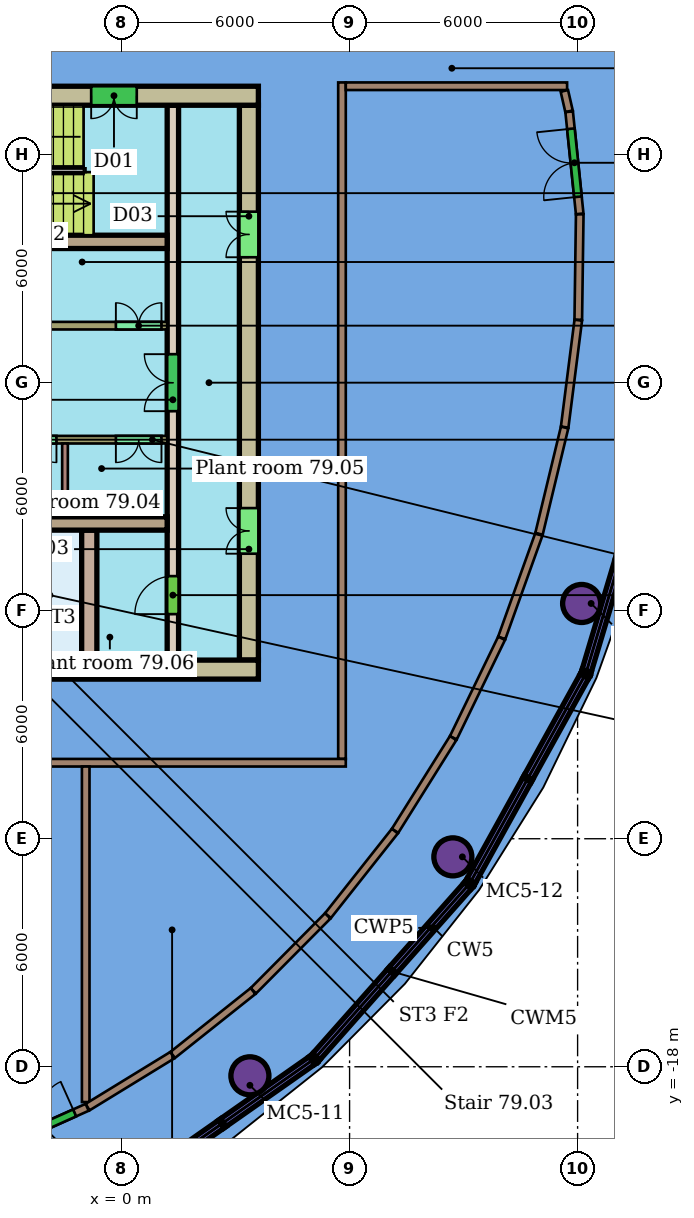
"""IFC4 building model, lengths in metres.
Left out: names, types, materials, properties, quantities, classifications, styles, units other than length and angle.
Written with IfcOpenShell. Run it as: python <this file> out.ifc"""

import sys

from ifc_helpers import new_model, si_unit, direction, frame, frame_2d, origin, origin_2d, place, context, subcontext, project, spatial, rectangle, hollow_circle, extrude, element, fill, save


model = new_model("IFC4")
c1 = context("Model", 3, precision=1e-05, world=origin(), true_north=direction((0.0, 1.0)))
c2 = subcontext(c1, "Body", "Model", "MODEL_VIEW")
j1 = project(units=[si_unit("LENGTHUNIT", "METRE"), si_unit("PLANEANGLEUNIT", "RADIAN")], contexts=[c1])
p1 = place(None, origin())
s1 = spatial("IfcSite", under=j1, at=p1, CompositionType="ELEMENT")
p2 = place(p1, origin())
s2 = spatial("IfcBuilding", under=s1, at=p2, CompositionType="ELEMENT")
p3 = place(p2, frame((0.0, 0.0, 317.1)))
s3 = spatial("IfcBuildingStorey", under=s2, at=p3, CompositionType="ELEMENT", Elevation=317.1)
for number, where, z_axis, x_axis in (
    (1, (3.377, -18.238, 0.0), (0.0, 0.0, 1.0), (1.0, 0.0, 0.0)),
    (2, (8.718, -12.477, 0.0), (0.0, 0.0, 1.0), (1.0, 0.0, 0.0)),
    (3, (12.106, -5.81, 0.0), (0.0, 0.0, 1.0), (1.0, 0.0, 0.0)),
):
    element("IfcColumn", number, at=place(p3, frame(where, z_axis=z_axis, x_axis=x_axis)), inside=s3, PredefinedType="COLUMN", context=c2, shape_type="SweptSolid", body=[
        extrude(hollow_circle(Radius=0.5, WallThickness=0.04, at=origin_2d()), origin(), (0.0, 0.0, 1.0), 4.0),
    ])
p4 = place(p3, frame((5.8, -9.9, 0.0), z_axis=(0.0, 0.0, 1.0), x_axis=(0.0, 1.0, 0.0)))
e4 = element("IfcWall", 4, at=p4, inside=s3, PredefinedType="PARTITIONING", context=c2, shape_type="SweptSolid", body=[
    extrude(rectangle(XDim=17.8, YDim=0.2, at=frame_2d((8.9, 0.0))), origin(), (0.0, 0.0, 1.0), 3.65),
])
p5 = place(p3, frame((-23.076, -10.0, 0.0), z_axis=(0.0, 0.0, 1.0), x_axis=(1.0, 0.0, 0.0)))
e5 = element("IfcWall", 5, at=p5, inside=s3, PredefinedType="PARTITIONING", context=c2, shape_type="SweptSolid", body=[
    extrude(rectangle(XDim=28.976, YDim=0.2, at=frame_2d((14.488, 0.0))), origin(), (0.0, 0.0, 1.0), 3.65),
])
p6 = place(p3, frame((5.9, 7.8, 0.0), z_axis=(0.0, 0.0, 1.0), x_axis=(1.0, 0.0, 0.0)))
e6 = element("IfcWall", 6, at=p6, inside=s3, PredefinedType="PARTITIONING", context=c2, shape_type="SweptSolid", body=[
    extrude(rectangle(XDim=5.824, YDim=0.2, at=frame_2d((2.912, 0.0))), origin(), (0.0, 0.0, 1.0), 3.65),
])
p7 = place(p3, frame((-0.944, -18.929, 0.0), z_axis=(0.0, 0.0, 1.0), x_axis=(0.0, 1.0, 0.0)))
e7 = element("IfcWall", 7, at=p7, inside=s3, PredefinedType="PARTITIONING", context=c2, shape_type="SweptSolid", body=[
    extrude(rectangle(XDim=8.829, YDim=0.2, at=frame_2d((4.415, 0.0))), origin(), (0.0, 0.0, 1.0), 3.65),
])
p8 = place(p3, frame((12.018, 1.656, 0.0), z_axis=(0.0, 0.0, 1.0), x_axis=(0.013897320686, 0.999903427576, 0.0)))
e8 = element("IfcWall", 8, at=p8, inside=s3, PredefinedType="PARTITIONING", context=c2, shape_type="SweptSolid", body=[
    extrude(rectangle(XDim=2.776, YDim=0.2, at=frame_2d((1.388, 0.0))), origin(), (0.0, 0.0, 1.0), 3.65),
])
p9 = place(p3, frame((11.659, -1.169, 0.0), z_axis=(0.0, 0.0, 1.0), x_axis=(0.126302032537, 0.991991832919, 0.0)))
e9 = element("IfcWall", 9, at=p9, inside=s3, PredefinedType="PARTITIONING", context=c2, shape_type="SweptSolid", body=[
    extrude(rectangle(XDim=2.836, YDim=0.2, at=frame_2d((1.418, 0.0))), origin(), (0.0, 0.0, 1.0), 3.65),
])
p10 = place(p3, frame((10.984, -3.977, 0.0), z_axis=(0.0, 0.0, 1.0), x_axis=(0.234120678443, 0.972207543648, 0.0)))
e10 = element("IfcWall", 10, at=p10, inside=s3, PredefinedType="PARTITIONING", context=c2, shape_type="SweptSolid", body=[
    extrude(rectangle(XDim=2.877, YDim=0.2, at=frame_2d((1.438, 0.0))), origin(), (0.0, 0.0, 1.0), 3.65),
])
p11 = place(p3, frame((10.004, -6.716, 0.0), z_axis=(0.0, 0.0, 1.0), x_axis=(0.337478197562, 0.941333344873, 0.0)))
e11 = element("IfcWall", 11, at=p11, inside=s3, PredefinedType="PARTITIONING", context=c2, shape_type="SweptSolid", body=[
    extrude(rectangle(XDim=2.898, YDim=0.2, at=frame_2d((1.449, 0.0))), origin(), (0.0, 0.0, 1.0), 3.65),
])
p12 = place(p3, frame((8.73, -9.343, 0.0), z_axis=(0.0, 0.0, 1.0), x_axis=(0.436405284506, 0.89975020292, 0.0)))
e12 = element("IfcWall", 12, at=p12, inside=s3, PredefinedType="PARTITIONING", context=c2, shape_type="SweptSolid", body=[
    extrude(rectangle(XDim=2.909, YDim=0.2, at=frame_2d((1.455, 0.0))), origin(), (0.0, 0.0, 1.0), 3.65),
])
p13 = place(p3, frame((7.198, -11.791, 0.0), z_axis=(0.0, 0.0, 1.0), x_axis=(0.530761457751, 0.847521253401, 0.0)))
e13 = element("IfcWall", 13, at=p13, inside=s3, PredefinedType="PARTITIONING", context=c2, shape_type="SweptSolid", body=[
    extrude(rectangle(XDim=2.877, YDim=0.2, at=frame_2d((1.438, 0.0))), origin(), (0.0, 0.0, 1.0), 3.65),
])
p14 = place(p3, frame((5.432, -14.023, 0.0), z_axis=(0.0, 0.0, 1.0), x_axis=(0.620327979869, 0.784342525553, 0.0)))
e14 = element("IfcWall", 14, at=p14, inside=s3, PredefinedType="PARTITIONING", context=c2, shape_type="SweptSolid", body=[
    extrude(rectangle(XDim=2.836, YDim=0.2, at=frame_2d((1.418, 0.0))), origin(), (0.0, 0.0, 1.0), 3.65),
])
p15 = place(p3, frame((3.468, -16.001, 0.0), z_axis=(0.0, 0.0, 1.0), x_axis=(0.704683921548, 0.70952136734, 0.0)))
e15 = element("IfcWall", 15, at=p15, inside=s3, PredefinedType="PARTITIONING", context=c2, shape_type="SweptSolid", body=[
    extrude(rectangle(XDim=2.776, YDim=0.2, at=frame_2d((1.388, 0.0))), origin(), (0.0, 0.0, 1.0), 3.65),
])
p16 = place(p3, frame((1.345, -17.689, 0.0), z_axis=(0.0, 0.0, 1.0), x_axis=(0.782656107767, 0.62245434931, 0.0)))
e16 = element("IfcWall", 16, at=p16, inside=s3, PredefinedType="PARTITIONING", context=c2, shape_type="SweptSolid", body=[
    extrude(rectangle(XDim=2.7, YDim=0.2, at=frame_2d((1.35, 0.0))), origin(), (0.0, 0.0, 1.0), 3.65),
])
p17 = place(p3, frame((-0.894, -19.061, 0.0), z_axis=(0.0, 0.0, 1.0), x_axis=(0.852667029926, 0.522454721557, 0.0)))
e17 = element("IfcWall", 17, at=p17, inside=s3, PredefinedType="PARTITIONING", context=c2, shape_type="SweptSolid", body=[
    extrude(rectangle(XDim=2.614, YDim=0.2, at=frame_2d((1.307, 0.0))), origin(), (0.0, 0.0, 1.0), 3.65),
])
p18 = place(p3, frame((-3.206, -20.097, 0.0), z_axis=(0.0, 0.0, 1.0), x_axis=(0.912552955942, 0.408958558538, 0.0)))
e18 = element("IfcWall", 18, at=p18, inside=s3, PredefinedType="PARTITIONING", context=c2, shape_type="SweptSolid", body=[
    extrude(rectangle(XDim=2.521, YDim=0.2, at=frame_2d((1.26, 0.0))), origin(), (0.0, 0.0, 1.0), 3.65),
])
p19 = place(p18, frame((0.36, 0.0, 0.0)))
e19 = element("IfcOpeningElement", 19, at=p19, cuts=e18, PredefinedType="OPENING", context=c2, shape_type="SweptSolid", body=[
    extrude(rectangle(XDim=1.8, YDim=2.4, at=frame_2d((0.9, 1.2))), frame((0.0, 0.11, 0.0), z_axis=(0.0, -1.0, 0.0), x_axis=(1.0, 0.0, 0.0)), (0.0, 0.0, 1.0), 0.22),
])
p20 = place(p3, frame((11.652, 7.678, 0.0), z_axis=(0.0, 0.0, 1.0), x_axis=(0.2234024776, -0.974726286196, 0.0)))
e20 = element("IfcWall", 20, at=p20, inside=s3, PredefinedType="PARTITIONING", context=c2, shape_type="SweptSolid", body=[
    extrude(rectangle(XDim=0.551, YDim=0.2, at=frame_2d((0.275, 0.0))), origin(), (0.0, 0.0, 1.0), 3.65),
])
p21 = place(p3, frame((12.055, 4.443, 0.0), z_axis=(0.0, 0.0, 1.0), x_axis=(-0.102877560919, 0.994694027055, 0.0)))
e21 = element("IfcWall", 21, at=p21, inside=s3, PredefinedType="PARTITIONING", context=c2, shape_type="SweptSolid", body=[
    extrude(rectangle(XDim=2.701, YDim=0.2, at=frame_2d((1.35, 0.0))), origin(), (0.0, 0.0, 1.0), 3.65),
])
p22 = place(p21, frame((0.45, 0.0, 0.0)))
e22 = element("IfcOpeningElement", 22, at=p22, cuts=e21, PredefinedType="OPENING", context=c2, shape_type="SweptSolid", body=[
    extrude(rectangle(XDim=1.8, YDim=2.4, at=frame_2d((0.9, 1.2))), frame((0.0, 0.11, 0.0), z_axis=(0.0, -1.0, 0.0), x_axis=(1.0, 0.0, 0.0)), (0.0, 0.0, 1.0), 0.22),
])
p23 = place(p3, frame((3.6, 7.55, 0.0), z_axis=(0.0, 0.0, 1.0), x_axis=(-1.0, 0.0, 0.0)))
e23 = element("IfcWall", 23, at=p23, inside=s3, PredefinedType="SHEAR", context=c2, shape_type="SweptSolid", body=[
    extrude(rectangle(XDim=9.6, YDim=0.5, at=frame_2d((4.8, 0.0))), origin(), (0.0, 0.0, 1.0), 3.9),
])
p24 = place(p23, frame((3.2, 0.0, 0.0)))
e24 = element("IfcOpeningElement", 24, at=p24, cuts=e23, PredefinedType="OPENING", context=c2, shape_type="SweptSolid", body=[
    extrude(rectangle(XDim=1.2, YDim=2.1, at=frame_2d((0.6, 1.05))), frame((0.0, 0.26, 0.0), z_axis=(0.0, -1.0, 0.0), x_axis=(1.0, 0.0, 0.0)), (0.0, 0.0, 1.0), 0.52),
])
p25 = place(p3, frame((-15.6, -7.55, 0.0), z_axis=(0.0, 0.0, 1.0), x_axis=(1.0, 0.0, 0.0)))
e25 = element("IfcWall", 25, at=p25, inside=s3, PredefinedType="SHEAR", context=c2, shape_type="SweptSolid", body=[
    extrude(rectangle(XDim=19.2, YDim=0.5, at=frame_2d((9.6, 0.0))), origin(), (0.0, 0.0, 1.0), 3.9),
])
p26 = place(p25, frame((3.6, 0.0, 0.0)))
e26 = element("IfcOpeningElement", 26, at=p26, cuts=e25, PredefinedType="OPENING", context=c2, shape_type="SweptSolid", body=[
    extrude(rectangle(XDim=1.2, YDim=2.1, at=frame_2d((0.6, 1.05))), frame((0.0, 0.26, 0.0), z_axis=(0.0, -1.0, 0.0), x_axis=(1.0, 0.0, 0.0)), (0.0, 0.0, 1.0), 0.52),
])
p27 = place(p3, frame((3.35, -7.3, 0.0), z_axis=(0.0, 0.0, 1.0), x_axis=(0.0, 1.0, 0.0)))
e27 = element("IfcWall", 27, at=p27, inside=s3, PredefinedType="SHEAR", context=c2, shape_type="SweptSolid", body=[
    extrude(rectangle(XDim=14.6, YDim=0.5, at=frame_2d((7.3, 0.0))), origin(), (0.0, 0.0, 1.0), 3.9),
])
p28 = place(p27, frame((2.8, 0.0, 0.0)))
e28 = element("IfcOpeningElement", 28, at=p28, cuts=e27, PredefinedType="OPENING", context=c2, shape_type="SweptSolid", body=[
    extrude(rectangle(XDim=1.2, YDim=2.1, at=frame_2d((0.6, 1.05))), frame((0.0, 0.26, 0.0), z_axis=(0.0, -1.0, 0.0), x_axis=(1.0, 0.0, 0.0)), (0.0, 0.0, 1.0), 0.52),
])
p29 = place(p27, frame((10.6, 0.0, 0.0)))
e29 = element("IfcOpeningElement", 29, at=p29, cuts=e27, PredefinedType="OPENING", context=c2, shape_type="SweptSolid", body=[
    extrude(rectangle(XDim=1.2, YDim=2.1, at=frame_2d((0.6, 1.05))), frame((0.0, 0.26, 0.0), z_axis=(0.0, -1.0, 0.0), x_axis=(1.0, 0.0, 0.0)), (0.0, 0.0, 1.0), 0.52),
])
for number, where, z_axis, x_axis in (
    (30, (-6.0, 3.705, 0.0), (0.0, 0.0, 1.0), (1.0, 0.0, 0.0)),
    (31, (-6.0, -3.705, 0.0), (0.0, 0.0, 1.0), (1.0, 0.0, 0.0)),
):
    element("IfcWall", number, at=place(p3, frame(where, z_axis=z_axis, x_axis=x_axis)), inside=s3, PredefinedType="SHEAR", context=c2, shape_type="SweptSolid", body=[
        extrude(rectangle(XDim=7.2, YDim=0.35, at=frame_2d((3.6, 0.0))), origin(), (0.0, 0.0, 1.0), 3.9),
    ])
p30 = place(p3, frame((1.35, -7.3, 0.0), z_axis=(0.0, 0.0, 1.0), x_axis=(0.0, 1.0, 0.0)))
e32 = element("IfcWall", 32, at=p30, inside=s3, PredefinedType="SHEAR", context=c2, shape_type="SweptSolid", body=[
    extrude(rectangle(XDim=14.6, YDim=0.3, at=frame_2d((7.3, 0.0))), origin(), (0.0, 0.0, 1.0), 3.9),
])
p31 = place(p30, frame((1.21, 0.0, 0.0)))
e33 = element("IfcOpeningElement", 33, at=p31, cuts=e32, PredefinedType="OPENING", context=c2, shape_type="SweptSolid", body=[
    extrude(rectangle(XDim=1.0, YDim=2.1, at=frame_2d((0.5, 1.05))), frame((0.0, 0.16, 0.0), z_axis=(0.0, -1.0, 0.0), x_axis=(1.0, 0.0, 0.0)), (0.0, 0.0, 1.0), 0.32),
])
p32 = place(p30, frame((6.55, 0.0, 0.0)))
e34 = element("IfcOpeningElement", 34, at=p32, cuts=e32, PredefinedType="OPENING", context=c2, shape_type="SweptSolid", body=[
    extrude(rectangle(XDim=1.5, YDim=2.1, at=frame_2d((0.75, 1.05))), frame((0.0, 0.16, 0.0), z_axis=(0.0, -1.0, 0.0), x_axis=(1.0, 0.0, 0.0)), (0.0, 0.0, 1.0), 0.32),
])
p33 = place(p3, frame((-13.2, 1.5, 0.0), z_axis=(0.0, 0.0, 1.0), x_axis=(1.0, 0.0, 0.0)))
e35 = element("IfcWall", 35, at=p33, inside=s3, PredefinedType="SHEAR", context=c2, shape_type="SweptSolid", body=[
    extrude(rectangle(XDim=14.4, YDim=0.2, at=frame_2d((7.2, 0.0))), origin(), (0.0, 0.0, 1.0), 3.9),
])
p34 = place(p33, frame((0.15, 0.0, 0.0)))
e36 = element("IfcOpeningElement", 36, at=p34, cuts=e35, PredefinedType="OPENING", context=c2, shape_type="SweptSolid", body=[
    extrude(rectangle(XDim=1.2, YDim=2.4, at=frame_2d((0.6, 1.2))), frame((0.0, 0.11, 0.0), z_axis=(0.0, -1.0, 0.0), x_axis=(1.0, 0.0, 0.0)), (0.0, 0.0, 1.0), 0.22),
])
p35 = place(p33, frame((9.519, 0.0, 0.0)))
e37 = element("IfcOpeningElement", 37, at=p35, cuts=e35, PredefinedType="OPENING", context=c2, shape_type="SweptSolid", body=[
    extrude(rectangle(XDim=1.2, YDim=2.4, at=frame_2d((0.6, 1.2))), frame((0.0, 0.11, 0.0), z_axis=(0.0, -1.0, 0.0), x_axis=(1.0, 0.0, 0.0)), (0.0, 0.0, 1.0), 0.22),
])
p36 = place(p33, frame((13.05, 0.0, 0.0)))
e38 = element("IfcOpeningElement", 38, at=p36, cuts=e35, PredefinedType="OPENING", context=c2, shape_type="SweptSolid", body=[
    extrude(rectangle(XDim=1.2, YDim=2.4, at=frame_2d((0.6, 1.2))), frame((0.0, 0.11, 0.0), z_axis=(0.0, -1.0, 0.0), x_axis=(1.0, 0.0, 0.0)), (0.0, 0.0, 1.0), 0.22),
])
p37 = place(p3, frame((1.2, -1.5, 0.0), z_axis=(0.0, 0.0, 1.0), x_axis=(-1.0, 0.0, 0.0)))
e39 = element("IfcWall", 39, at=p37, inside=s3, PredefinedType="SHEAR", context=c2, shape_type="SweptSolid", body=[
    extrude(rectangle(XDim=14.4, YDim=0.2, at=frame_2d((7.2, 0.0))), origin(), (0.0, 0.0, 1.0), 3.9),
])
p38 = place(p37, frame((7.821, 0.0, 0.0)))
e40 = element("IfcOpeningElement", 40, at=p38, cuts=e39, PredefinedType="OPENING", context=c2, shape_type="SweptSolid", body=[
    extrude(rectangle(XDim=1.2, YDim=2.1, at=frame_2d((0.6, 1.05))), frame((0.0, 0.11, 0.0), z_axis=(0.0, -1.0, 0.0), x_axis=(1.0, 0.0, 0.0)), (0.0, 0.0, 1.0), 0.22),
])
p39 = place(p37, frame((2.914, 0.0, 0.0)))
e41 = element("IfcOpeningElement", 41, at=p39, cuts=e39, PredefinedType="OPENING", context=c2, shape_type="SweptSolid", body=[
    extrude(rectangle(XDim=1.2, YDim=2.4, at=frame_2d((0.6, 1.2))), frame((0.0, 0.11, 0.0), z_axis=(0.0, -1.0, 0.0), x_axis=(1.0, 0.0, 0.0)), (0.0, 0.0, 1.0), 0.22),
])
p40 = place(p37, frame((0.15, 0.0, 0.0)))
e42 = element("IfcOpeningElement", 42, at=p40, cuts=e39, PredefinedType="OPENING", context=c2, shape_type="SweptSolid", body=[
    extrude(rectangle(XDim=1.2, YDim=2.4, at=frame_2d((0.6, 1.2))), frame((0.0, 0.11, 0.0), z_axis=(0.0, -1.0, 0.0), x_axis=(1.0, 0.0, 0.0)), (0.0, 0.0, 1.0), 0.22),
])
p41 = place(p3, frame((-0.85, -3.88, 0.0), z_axis=(0.0, 0.0, 1.0), x_axis=(0.0, -1.0, 0.0)))
e43 = element("IfcWall", 43, at=p41, inside=s3, PredefinedType="SHEAR", context=c2, shape_type="SweptSolid", body=[
    extrude(rectangle(XDim=3.42, YDim=0.4, at=frame_2d((1.71, 0.0))), origin(), (0.0, 0.0, 1.0), 3.9),
])
p42 = place(p3, frame((-1.489, -1.6, 0.0), z_axis=(0.0, 0.0, 1.0), x_axis=(0.0, -1.0, 0.0)))
e44 = element("IfcWall", 44, at=p42, inside=s3, PredefinedType="PARTITIONING", context=c2, shape_type="SweptSolid", body=[
    extrude(rectangle(XDim=1.93, YDim=0.15, at=frame_2d((0.965, 0.0))), origin(), (0.0, 0.0, 1.0), 3.9),
])
p43 = place(p19, origin())
e45 = element("IfcDoor", 45, at=p43, inside=s3, OperationType="DOUBLE_DOOR_SINGLE_SWING", PredefinedType="DOOR", context=c2, shape_type="SweptSolid", body=[
    extrude(rectangle(XDim=1.8, YDim=2.4, at=frame_2d((0.9, 1.2))), frame((0.0, 0.025, 0.0), z_axis=(0.0, -1.0, 0.0), x_axis=(1.0, 0.0, 0.0)), (0.0, 0.0, 1.0), 0.05),
])
fill(e19, e45)
p44 = place(p22, origin())
e46 = element("IfcDoor", 46, at=p44, inside=s3, OperationType="DOUBLE_DOOR_SINGLE_SWING", PredefinedType="DOOR", context=c2, shape_type="SweptSolid", body=[
    extrude(rectangle(XDim=1.8, YDim=2.4, at=frame_2d((0.9, 1.2))), frame((0.0, 0.025, 0.0), z_axis=(0.0, -1.0, 0.0), x_axis=(1.0, 0.0, 0.0)), (0.0, 0.0, 1.0), 0.05),
])
fill(e22, e46)
p45 = place(p24, origin())
e47 = element("IfcDoor", 47, at=p45, inside=s3, OperationType="DOUBLE_DOOR_SINGLE_SWING", PredefinedType="NOTDEFINED", context=c2, shape_type="SweptSolid", body=[
    extrude(rectangle(XDim=1.2, YDim=2.1, at=frame_2d((0.6, 1.05))), frame((0.0, 0.025, 0.0), z_axis=(0.0, -1.0, 0.0), x_axis=(1.0, 0.0, 0.0)), (0.0, 0.0, 1.0), 0.05),
])
fill(e24, e47)
p46 = place(p28, origin())
e48 = element("IfcDoor", 48, at=p46, inside=s3, OperationType="DOUBLE_DOOR_SINGLE_SWING", PredefinedType="NOTDEFINED", context=c2, shape_type="SweptSolid", body=[
    extrude(rectangle(XDim=1.2, YDim=2.1, at=frame_2d((0.6, 1.05))), frame((0.0, 0.025, 0.0), z_axis=(0.0, -1.0, 0.0), x_axis=(1.0, 0.0, 0.0)), (0.0, 0.0, 1.0), 0.05),
])
fill(e28, e48)
p47 = place(p29, origin())
e49 = element("IfcDoor", 49, at=p47, inside=s3, OperationType="DOUBLE_DOOR_SINGLE_SWING", PredefinedType="NOTDEFINED", context=c2, shape_type="SweptSolid", body=[
    extrude(rectangle(XDim=1.2, YDim=2.1, at=frame_2d((0.6, 1.05))), frame((0.0, 0.025, 0.0), z_axis=(0.0, -1.0, 0.0), x_axis=(1.0, 0.0, 0.0)), (0.0, 0.0, 1.0), 0.05),
])
fill(e29, e49)
p48 = place(p31, origin())
e50 = element("IfcDoor", 50, at=p48, inside=s3, OperationType="SINGLE_SWING_LEFT", PredefinedType="NOTDEFINED", context=c2, shape_type="SweptSolid", body=[
    extrude(rectangle(XDim=1.0, YDim=2.1, at=frame_2d((0.5, 1.05))), frame((0.0, 0.025, 0.0), z_axis=(0.0, -1.0, 0.0), x_axis=(1.0, 0.0, 0.0)), (0.0, 0.0, 1.0), 0.05),
])
fill(e33, e50)
p49 = place(p32, origin())
e51 = element("IfcDoor", 51, at=p49, inside=s3, OperationType="DOUBLE_DOOR_SINGLE_SWING", PredefinedType="NOTDEFINED", context=c2, shape_type="SweptSolid", body=[
    extrude(rectangle(XDim=1.5, YDim=2.1, at=frame_2d((0.75, 1.05))), frame((0.0, 0.025, 0.0), z_axis=(0.0, -1.0, 0.0), x_axis=(1.0, 0.0, 0.0)), (0.0, 0.0, 1.0), 0.05),
])
fill(e34, e51)
p50 = place(p36, origin())
e52 = element("IfcDoor", 52, at=p50, inside=s3, OperationType="DOUBLE_DOOR_SINGLE_SWING", PredefinedType="NOTDEFINED", context=c2, shape_type="SweptSolid", body=[
    extrude(rectangle(XDim=1.2, YDim=2.4, at=frame_2d((0.6, 1.2))), frame((0.0, 0.025, 0.0), z_axis=(0.0, -1.0, 0.0), x_axis=(1.0, 0.0, 0.0)), (0.0, 0.0, 1.0), 0.05),
])
fill(e38, e52)
p51 = place(p39, origin())
e53 = element("IfcDoor", 53, at=p51, inside=s3, OperationType="DOUBLE_DOOR_SINGLE_SWING", PredefinedType="NOTDEFINED", context=c2, shape_type="SweptSolid", body=[
    extrude(rectangle(XDim=1.2, YDim=2.4, at=frame_2d((0.6, 1.2))), frame((0.0, 0.025, 0.0), z_axis=(0.0, -1.0, 0.0), x_axis=(1.0, 0.0, 0.0)), (0.0, 0.0, 1.0), 0.05),
])
fill(e41, e53)
p52 = place(p40, origin())
e54 = element("IfcDoor", 54, at=p52, inside=s3, OperationType="DOUBLE_DOOR_SINGLE_SWING", PredefinedType="NOTDEFINED", context=c2, shape_type="SweptSolid", body=[
    extrude(rectangle(XDim=1.2, YDim=2.4, at=frame_2d((0.6, 1.2))), frame((0.0, 0.025, 0.0), z_axis=(0.0, -1.0, 0.0), x_axis=(1.0, 0.0, 0.0)), (0.0, 0.0, 1.0), 0.05),
])
fill(e42, e54)
save(model, sys.argv[1])
